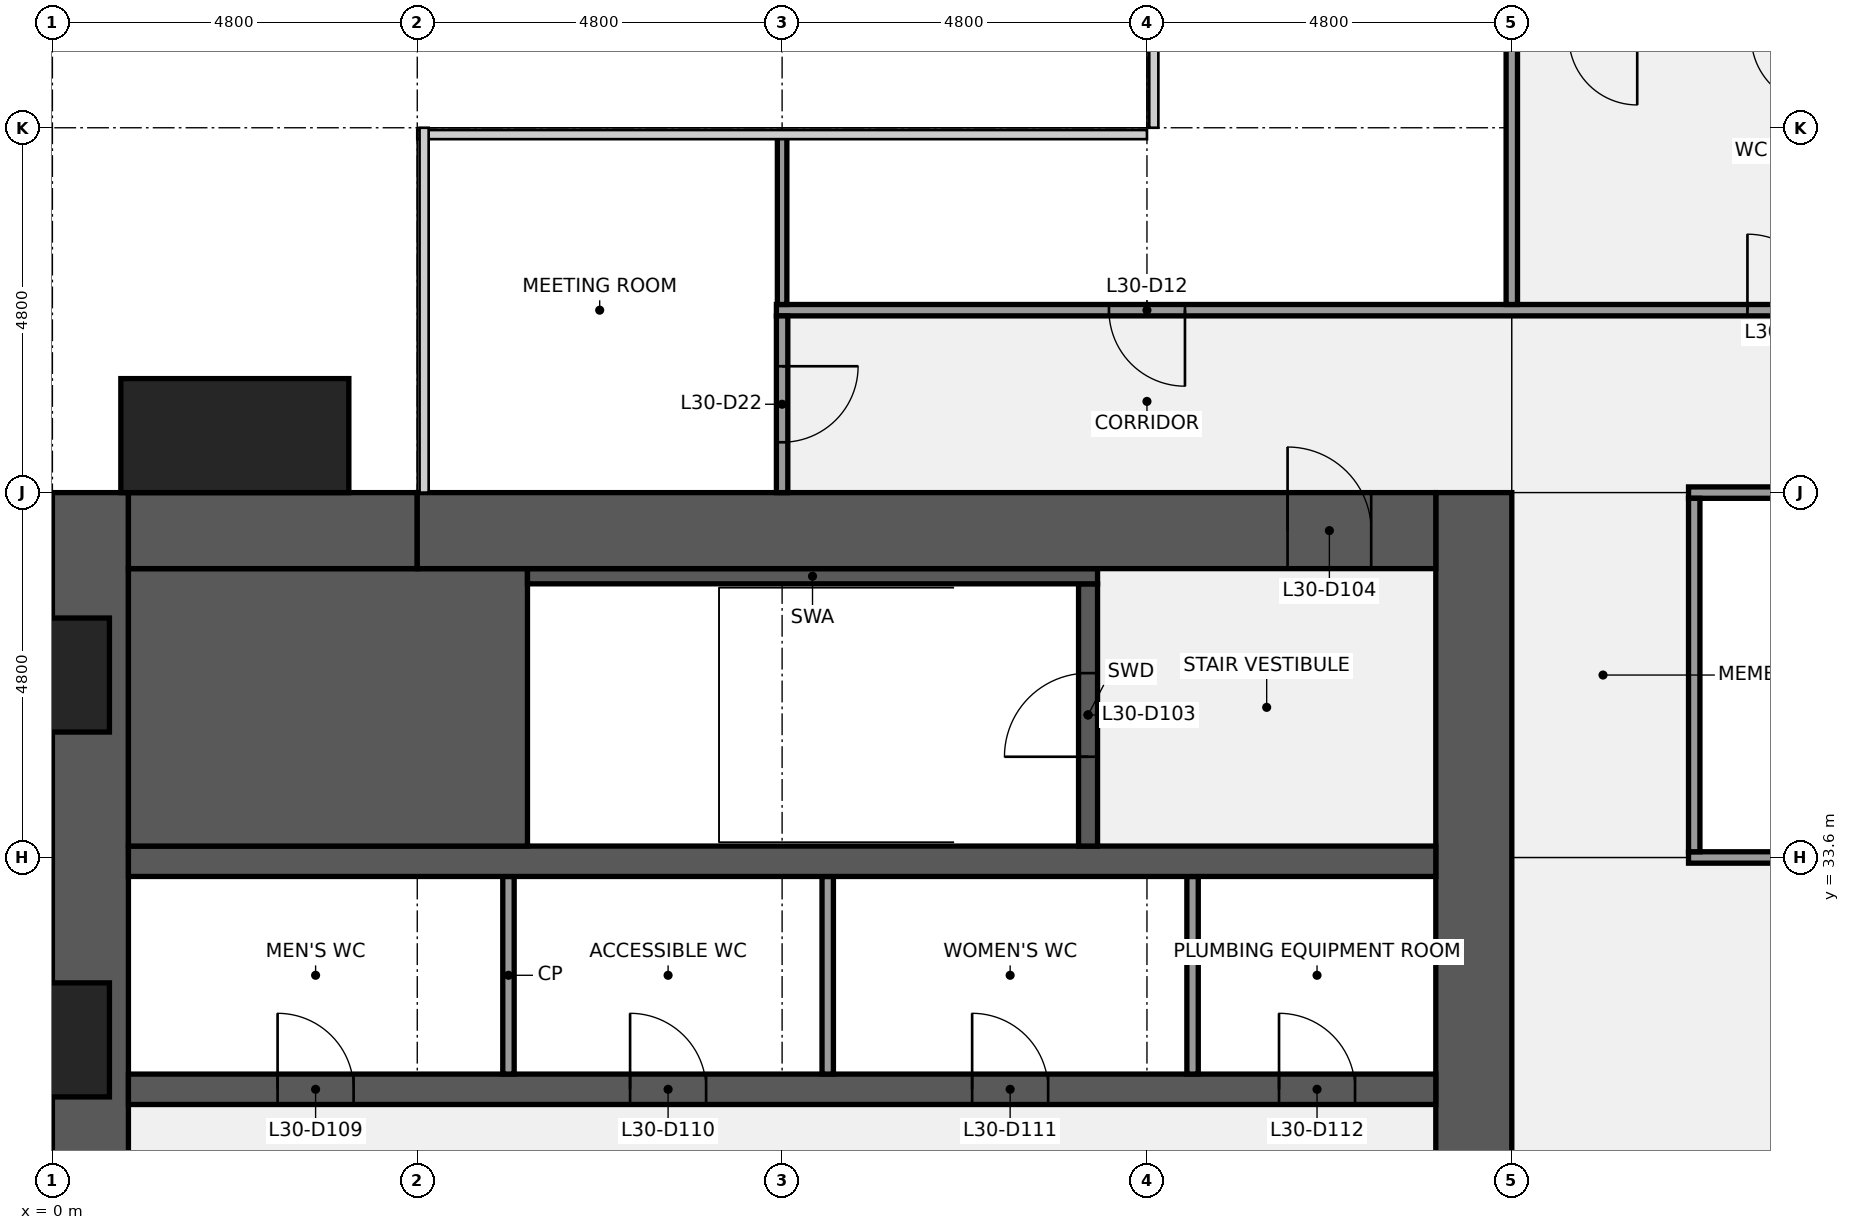
"""IFC4 building model, lengths in metres.
Left out: names, types, materials, properties, quantities, classifications, styles, units other than length and angle.
Written with IfcOpenShell. Run it as: python <this file> out.ifc"""

import sys

from ifc_helpers import new_model, si_unit, direction, frame, frame_2d, origin, origin_2d, place, context, subcontext, project, spatial, rectangle, extrude, element, fill, save


model = new_model("IFC4")
c1 = context("Model", 3, precision=1e-05, world=origin(), true_north=direction((0.0, 1.0)))
c2 = subcontext(c1, "Body", "Model", "MODEL_VIEW")
j1 = project(units=[si_unit("LENGTHUNIT", "METRE"), si_unit("PLANEANGLEUNIT", "RADIAN")], contexts=[c1])
p1 = place(None, origin())
s1 = spatial("IfcSite", under=j1, at=p1, CompositionType="ELEMENT")
p2 = place(p1, origin())
s2 = spatial("IfcBuilding", under=s1, at=p2, CompositionType="ELEMENT")
p3 = place(p2, frame((0.0, 0.0, 140.1)))
s3 = spatial("IfcBuildingStorey", under=s2, at=p3, CompositionType="ELEMENT", Elevation=140.1)
p4 = place(p3, frame((0.5, 9.6, 0.0), z_axis=(0.0, 0.0, 1.0), x_axis=(0.0, 1.0, 0.0)))
e1 = element("IfcWall", 1, at=p4, inside=s3, PredefinedType="SHEAR", context=c2, shape_type="SweptSolid", body=[
    extrude(rectangle(XDim=28.8, YDim=1.0, at=frame_2d((14.4, 0.0))), origin(), (0.0, 0.0, 1.0), 3.84),
])
p5 = place(p4, frame((8.85, 0.0, 0.9)))
e2 = element("IfcOpeningElement", 2, at=p5, cuts=e1, PredefinedType="OPENING", context=c2, shape_type="SweptSolid", body=[
    extrude(rectangle(XDim=1.5, YDim=1.5, at=frame_2d((0.75, 0.75))), frame((0.0, 0.51, 0.0), z_axis=(0.0, -1.0, 0.0), x_axis=(1.0, 0.0, 0.0)), (0.0, 0.0, 1.0), 1.02),
])
p6 = place(p4, frame((18.45, 0.0, 0.9)))
e3 = element("IfcOpeningElement", 3, at=p6, cuts=e1, PredefinedType="OPENING", context=c2, shape_type="SweptSolid", body=[
    extrude(rectangle(XDim=1.5, YDim=1.5, at=frame_2d((0.75, 0.75))), frame((0.0, 0.51, 0.0), z_axis=(0.0, -1.0, 0.0), x_axis=(1.0, 0.0, 0.0)), (0.0, 0.0, 1.0), 1.02),
])
p7 = place(p3, frame((18.7, 38.4, 0.0), z_axis=(0.0, 0.0, 1.0), x_axis=(0.0, -1.0, 0.0)))
e4 = element("IfcWall", 4, at=p7, inside=s3, PredefinedType="SHEAR", context=c2, shape_type="SweptSolid", body=[
    extrude(rectangle(XDim=28.8, YDim=1.0, at=frame_2d((14.4, 0.0))), origin(), (0.0, 0.0, 1.0), 3.84),
])
p8 = place(p7, frame((18.3, 0.0, 0.0)))
e5 = element("IfcOpeningElement", 5, at=p8, cuts=e4, PredefinedType="OPENING", context=c2, shape_type="SweptSolid", body=[
    extrude(rectangle(XDim=1.8, YDim=2.1, at=frame_2d((0.9, 1.05))), frame((0.0, 0.51, 0.0), z_axis=(0.0, -1.0, 0.0), x_axis=(1.0, 0.0, 0.0)), (0.0, 0.0, 1.0), 1.02),
])
p9 = place(p7, frame((8.7, 0.0, 0.0)))
e6 = element("IfcOpeningElement", 6, at=p9, cuts=e4, PredefinedType="OPENING", context=c2, shape_type="SweptSolid", body=[
    extrude(rectangle(XDim=1.8, YDim=2.1, at=frame_2d((0.9, 1.05))), frame((0.0, 0.51, 0.0), z_axis=(0.0, -1.0, 0.0), x_axis=(1.0, 0.0, 0.0)), (0.0, 0.0, 1.0), 1.02),
])
p10 = place(p3, frame((1.0, 30.55, 0.0), z_axis=(0.0, 0.0, 1.0), x_axis=(1.0, 0.0, 0.0)))
e7 = element("IfcWall", 7, at=p10, inside=s3, PredefinedType="SHEAR", context=c2, shape_type="SweptSolid", body=[
    extrude(rectangle(XDim=17.2, YDim=0.4, at=frame_2d((8.6, 0.0))), origin(), (0.0, 0.0, 1.0), 3.84),
])
p11 = place(p10, frame((1.962, 0.0, 0.0)))
e8 = element("IfcOpeningElement", 8, at=p11, cuts=e7, PredefinedType="OPENING", context=c2, shape_type="SweptSolid", body=[
    extrude(rectangle(XDim=1.0, YDim=2.1, at=frame_2d((0.5, 1.05))), frame((0.0, 0.21, 0.0), z_axis=(0.0, -1.0, 0.0), x_axis=(1.0, 0.0, 0.0)), (0.0, 0.0, 1.0), 0.42),
])
p12 = place(p10, frame((6.6, 0.0, 0.0)))
e9 = element("IfcOpeningElement", 9, at=p12, cuts=e7, PredefinedType="OPENING", context=c2, shape_type="SweptSolid", body=[
    extrude(rectangle(XDim=1.0, YDim=2.1, at=frame_2d((0.5, 1.05))), frame((0.0, 0.21, 0.0), z_axis=(0.0, -1.0, 0.0), x_axis=(1.0, 0.0, 0.0)), (0.0, 0.0, 1.0), 0.42),
])
p13 = place(p10, frame((11.1, 0.0, 0.0)))
e10 = element("IfcOpeningElement", 10, at=p13, cuts=e7, PredefinedType="OPENING", context=c2, shape_type="SweptSolid", body=[
    extrude(rectangle(XDim=1.0, YDim=2.1, at=frame_2d((0.5, 1.05))), frame((0.0, 0.21, 0.0), z_axis=(0.0, -1.0, 0.0), x_axis=(1.0, 0.0, 0.0)), (0.0, 0.0, 1.0), 0.42),
])
p14 = place(p10, frame((15.137, 0.0, 0.0)))
e11 = element("IfcOpeningElement", 11, at=p14, cuts=e7, PredefinedType="OPENING", context=c2, shape_type="SweptSolid", body=[
    extrude(rectangle(XDim=1.0, YDim=2.1, at=frame_2d((0.5, 1.05))), frame((0.0, 0.21, 0.0), z_axis=(0.0, -1.0, 0.0), x_axis=(1.0, 0.0, 0.0)), (0.0, 0.0, 1.0), 0.42),
])
for number, where, z_axis, x_axis in (
    (12, (6.0, 30.75, 0.0), (0.0, 0.0, 1.0), (0.0, 1.0, 0.0)),
    (13, (10.2, 30.75, 0.0), (0.0, 0.0, 1.0), (0.0, 1.0, 0.0)),
    (14, (15.0, 30.75, 0.0), (0.0, 0.0, 1.0), (0.0, 1.0, 0.0)),
):
    element("IfcWall", number, at=place(p3, frame(where, z_axis=z_axis, x_axis=x_axis)), inside=s3, PredefinedType="PARTITIONING", context=c2, shape_type="SweptSolid", body=[
        extrude(rectangle(XDim=2.6, YDim=0.15, at=frame_2d((1.3, 0.0))), origin(), (0.0, 0.0, 1.0), 3.84),
    ])
p15 = place(p3, frame((1.0, 33.55, 0.0), z_axis=(0.0, 0.0, 1.0), x_axis=(1.0, 0.0, 0.0)))
e15 = element("IfcWall", 15, at=p15, inside=s3, PredefinedType="SHEAR", context=c2, shape_type="SweptSolid", body=[
    extrude(rectangle(XDim=17.2, YDim=0.4, at=frame_2d((8.6, 0.0))), origin(), (0.0, 0.0, 1.0), 3.84),
])
p16 = place(p3, frame((1.0, 35.575, 0.0), z_axis=(0.0, 0.0, 1.0), x_axis=(1.0, 0.0, 0.0)))
e16 = element("IfcWall", 16, at=p16, inside=s3, PredefinedType="SHEAR", context=c2, shape_type="SweptSolid", body=[
    extrude(rectangle(XDim=5.25, YDim=3.65, at=frame_2d((2.625, 0.0))), origin(), (0.0, 0.0, 1.0), 3.84),
])
p17 = place(p3, frame((13.625, 33.75, 0.0), z_axis=(0.0, 0.0, 1.0), x_axis=(0.0, 1.0, 0.0)))
e17 = element("IfcWall", 17, at=p17, inside=s3, PredefinedType="SHEAR", context=c2, shape_type="SweptSolid", body=[
    extrude(rectangle(XDim=3.45, YDim=0.25, at=frame_2d((1.725, 0.0))), origin(), (0.0, 0.0, 1.0), 3.84),
])
p18 = place(p17, frame((1.175, 0.0, 0.0)))
e18 = element("IfcOpeningElement", 18, at=p18, cuts=e17, PredefinedType="OPENING", context=c2, shape_type="SweptSolid", body=[
    extrude(rectangle(XDim=1.1, YDim=2.1, at=frame_2d((0.55, 1.05))), frame((0.0, 0.135, 0.0), z_axis=(0.0, -1.0, 0.0), x_axis=(1.0, 0.0, 0.0)), (0.0, 0.0, 1.0), 0.27),
])
p19 = place(p3, frame((6.25, 37.3, 0.0), z_axis=(0.0, 0.0, 1.0), x_axis=(1.0, 0.0, 0.0)))
e19 = element("IfcWall", 19, at=p19, inside=s3, PredefinedType="SHEAR", context=c2, shape_type="SweptSolid", body=[
    extrude(rectangle(XDim=7.5, YDim=0.2, at=frame_2d((3.75, 0.0))), origin(), (0.0, 0.0, 1.0), 3.84),
])
p20 = place(p3, frame((1.0, 37.9, 0.0), z_axis=(0.0, 0.0, 1.0), x_axis=(1.0, 0.0, 0.0)))
e20 = element("IfcWall", 20, at=p20, inside=s3, PredefinedType="SHEAR", context=c2, shape_type="SweptSolid", body=[
    extrude(rectangle(XDim=3.8, YDim=1.0, at=frame_2d((1.9, 0.0))), origin(), (0.0, 0.0, 1.0), 3.84),
])
p21 = place(p3, frame((4.8, 37.9, 0.0), z_axis=(0.0, 0.0, 1.0), x_axis=(1.0, 0.0, 0.0)))
e21 = element("IfcWall", 21, at=p21, inside=s3, PredefinedType="SHEAR", context=c2, shape_type="SweptSolid", body=[
    extrude(rectangle(XDim=13.4, YDim=1.0, at=frame_2d((6.7, 0.0))), origin(), (0.0, 0.0, 1.0), 3.84),
])
p22 = place(p21, frame((11.45, 0.0, 0.0)))
e22 = element("IfcOpeningElement", 22, at=p22, cuts=e21, PredefinedType="OPENING", context=c2, shape_type="SweptSolid", body=[
    extrude(rectangle(XDim=1.1, YDim=2.1, at=frame_2d((0.55, 1.05))), frame((0.0, 0.51, 0.0), z_axis=(0.0, -1.0, 0.0), x_axis=(1.0, 0.0, 0.0)), (0.0, 0.0, 1.0), 1.02),
])
p23 = place(p3, frame((21.525, 33.6, 0.0), z_axis=(0.0, 0.0, 1.0), x_axis=(1.0, 0.0, 0.0)))
e23 = element("IfcWall", 23, at=p23, inside=s3, PredefinedType="PARTITIONING", context=c2, shape_type="SweptSolid", body=[
    extrude(rectangle(XDim=2.55, YDim=0.15, at=frame_2d((1.275, 0.0))), origin(), (0.0, 0.0, 1.0), 2.936),
])
p24 = place(p3, frame((21.525, 38.4, 0.0), z_axis=(0.0, 0.0, 1.0), x_axis=(1.0, 0.0, 0.0)))
e24 = element("IfcWall", 24, at=p24, inside=s3, PredefinedType="PARTITIONING", context=c2, shape_type="SweptSolid", body=[
    extrude(rectangle(XDim=14.55, YDim=0.15, at=frame_2d((7.275, 0.0))), origin(), (0.0, 0.0, 1.0), 2.936),
])
p25 = place(p24, frame((3.175, 0.0, 0.0)))
e25 = element("IfcOpeningElement", 25, at=p25, cuts=e24, PredefinedType="OPENING", context=c2, shape_type="SweptSolid", body=[
    extrude(rectangle(XDim=1.0, YDim=2.1, at=frame_2d((0.5, 1.05))), frame((0.0, 0.085, 0.0), z_axis=(0.0, -1.0, 0.0), x_axis=(1.0, 0.0, 0.0)), (0.0, 0.0, 1.0), 0.17),
])
p26 = place(p24, frame((10.375, 0.0, 0.0)))
e26 = element("IfcOpeningElement", 26, at=p26, cuts=e24, PredefinedType="OPENING", context=c2, shape_type="SweptSolid", body=[
    extrude(rectangle(XDim=1.0, YDim=2.1, at=frame_2d((0.5, 1.05))), frame((0.0, 0.085, 0.0), z_axis=(0.0, -1.0, 0.0), x_axis=(1.0, 0.0, 0.0)), (0.0, 0.0, 1.0), 0.17),
])
p27 = place(p3, frame((9.525, 40.8, 0.0), z_axis=(0.0, 0.0, 1.0), x_axis=(1.0, 0.0, 0.0)))
e27 = element("IfcWall", 27, at=p27, inside=s3, PredefinedType="PARTITIONING", context=c2, shape_type="SweptSolid", body=[
    extrude(rectangle(XDim=38.55, YDim=0.15, at=frame_2d((19.275, 0.0))), origin(), (0.0, 0.0, 1.0), 2.936),
])
p28 = place(p27, frame((4.375, 0.0, 0.0)))
e28 = element("IfcOpeningElement", 28, at=p28, cuts=e27, PredefinedType="OPENING", context=c2, shape_type="SweptSolid", body=[
    extrude(rectangle(XDim=1.0, YDim=2.1, at=frame_2d((0.5, 1.05))), frame((0.0, 0.085, 0.0), z_axis=(0.0, -1.0, 0.0), x_axis=(1.0, 0.0, 0.0)), (0.0, 0.0, 1.0), 0.17),
])
p29 = place(p27, frame((12.775, 0.0, 0.0)))
e29 = element("IfcOpeningElement", 29, at=p29, cuts=e27, PredefinedType="OPENING", context=c2, shape_type="SweptSolid", body=[
    extrude(rectangle(XDim=1.0, YDim=2.1, at=frame_2d((0.5, 1.05))), frame((0.0, 0.085, 0.0), z_axis=(0.0, -1.0, 0.0), x_axis=(1.0, 0.0, 0.0)), (0.0, 0.0, 1.0), 0.17),
])
p30 = place(p27, frame((17.575, 0.0, 0.0)))
e30 = element("IfcOpeningElement", 30, at=p30, cuts=e27, PredefinedType="OPENING", context=c2, shape_type="SweptSolid", body=[
    extrude(rectangle(XDim=1.0, YDim=2.1, at=frame_2d((0.5, 1.05))), frame((0.0, 0.085, 0.0), z_axis=(0.0, -1.0, 0.0), x_axis=(1.0, 0.0, 0.0)), (0.0, 0.0, 1.0), 0.17),
])
p31 = place(p27, frame((19.975, 0.0, 0.0)))
e31 = element("IfcOpeningElement", 31, at=p31, cuts=e27, PredefinedType="OPENING", context=c2, shape_type="SweptSolid", body=[
    extrude(rectangle(XDim=1.0, YDim=2.1, at=frame_2d((0.5, 1.05))), frame((0.0, 0.085, 0.0), z_axis=(0.0, -1.0, 0.0), x_axis=(1.0, 0.0, 0.0)), (0.0, 0.0, 1.0), 0.17),
])
p32 = place(p27, frame((23.575, 0.0, 0.0)))
e32 = element("IfcOpeningElement", 32, at=p32, cuts=e27, PredefinedType="OPENING", context=c2, shape_type="SweptSolid", body=[
    extrude(rectangle(XDim=1.0, YDim=2.1, at=frame_2d((0.5, 1.05))), frame((0.0, 0.085, 0.0), z_axis=(0.0, -1.0, 0.0), x_axis=(1.0, 0.0, 0.0)), (0.0, 0.0, 1.0), 0.17),
])
p33 = place(p27, frame((27.175, 0.0, 0.0)))
e33 = element("IfcOpeningElement", 33, at=p33, cuts=e27, PredefinedType="OPENING", context=c2, shape_type="SweptSolid", body=[
    extrude(rectangle(XDim=1.0, YDim=2.1, at=frame_2d((0.5, 1.05))), frame((0.0, 0.085, 0.0), z_axis=(0.0, -1.0, 0.0), x_axis=(1.0, 0.0, 0.0)), (0.0, 0.0, 1.0), 0.17),
])
p34 = place(p27, frame((33.175, 0.0, 0.0)))
e34 = element("IfcOpeningElement", 34, at=p34, cuts=e27, PredefinedType="OPENING", context=c2, shape_type="SweptSolid", body=[
    extrude(rectangle(XDim=1.0, YDim=2.1, at=frame_2d((0.5, 1.05))), frame((0.0, 0.085, 0.0), z_axis=(0.0, -1.0, 0.0), x_axis=(1.0, 0.0, 0.0)), (0.0, 0.0, 1.0), 0.17),
])
p35 = place(p3, frame((9.6, 40.875, 0.0), z_axis=(0.0, 0.0, 1.0), x_axis=(0.0, 1.0, 0.0)))
e35 = element("IfcWall", 35, at=p35, inside=s3, PredefinedType="PARTITIONING", context=c2, shape_type="SweptSolid", body=[
    extrude(rectangle(XDim=2.225, YDim=0.125, at=frame_2d((1.113, 0.0))), origin(), (0.0, 0.0, 1.0), 2.936),
])
p36 = place(p3, frame((9.6, 38.4, 0.0), z_axis=(0.0, 0.0, 1.0), x_axis=(0.0, 1.0, 0.0)))
e36 = element("IfcWall", 36, at=p36, inside=s3, PredefinedType="PARTITIONING", context=c2, shape_type="SweptSolid", body=[
    extrude(rectangle(XDim=2.325, YDim=0.15, at=frame_2d((1.163, 0.0))), origin(), (0.0, 0.0, 1.0), 2.936),
])
p37 = place(p36, frame((0.663, 0.0, 0.0)))
e37 = element("IfcOpeningElement", 37, at=p37, cuts=e36, PredefinedType="OPENING", context=c2, shape_type="SweptSolid", body=[
    extrude(rectangle(XDim=1.0, YDim=2.1, at=frame_2d((0.5, 1.05))), frame((0.0, 0.085, 0.0), z_axis=(0.0, -1.0, 0.0), x_axis=(1.0, 0.0, 0.0)), (0.0, 0.0, 1.0), 0.17),
])
p38 = place(p3, frame((19.2, 40.875, 0.0), z_axis=(0.0, 0.0, 1.0), x_axis=(0.0, 1.0, 0.0)))
e38 = element("IfcWall", 38, at=p38, inside=s3, PredefinedType="PARTITIONING", context=c2, shape_type="SweptSolid", body=[
    extrude(rectangle(XDim=3.45, YDim=0.15, at=frame_2d((1.725, 0.0))), origin(), (0.0, 0.0, 1.0), 2.936),
])
p39 = place(p3, frame((21.6, 33.675, 0.0), z_axis=(0.0, 0.0, 1.0), x_axis=(0.0, 1.0, 0.0)))
e39 = element("IfcWall", 39, at=p39, inside=s3, PredefinedType="PARTITIONING", context=c2, shape_type="SweptSolid", body=[
    extrude(rectangle(XDim=4.65, YDim=0.15, at=frame_2d((2.325, 0.0))), origin(), (0.0, 0.0, 1.0), 2.936),
])
p40 = place(p3, frame((2.4, 39.15, 0.0), z_axis=(0.0, 0.0, 1.0), x_axis=(1.0, 0.0, 0.0)))
e40 = element("IfcColumn", 40, at=p40, inside=s3, PredefinedType="PILASTER", context=c2, shape_type="SweptSolid", body=[
    extrude(rectangle(XDim=3.0, YDim=1.5, at=origin_2d()), origin(), (0.0, 0.0, 1.0), 4.0),
])
p41 = place(p18, origin())
e41 = element("IfcDoor", 41, at=p41, inside=s3, OperationType="SINGLE_SWING_LEFT", PredefinedType="DOOR", context=c2, shape_type="SweptSolid", body=[
    extrude(rectangle(XDim=1.1, YDim=2.1, at=frame_2d((0.55, 1.05))), frame((0.0, 0.025, 0.0), z_axis=(0.0, -1.0, 0.0), x_axis=(1.0, 0.0, 0.0)), (0.0, 0.0, 1.0), 0.05),
])
fill(e18, e41)
p42 = place(p22, origin())
e42 = element("IfcDoor", 42, at=p42, inside=s3, OperationType="SINGLE_SWING_LEFT", PredefinedType="DOOR", context=c2, shape_type="SweptSolid", body=[
    extrude(rectangle(XDim=1.1, YDim=2.1, at=frame_2d((0.55, 1.05))), frame((0.0, 0.025, 0.0), z_axis=(0.0, -1.0, 0.0), x_axis=(1.0, 0.0, 0.0)), (0.0, 0.0, 1.0), 0.05),
])
fill(e22, e42)
p43 = place(p11, origin())
e43 = element("IfcDoor", 43, at=p43, inside=s3, OperationType="SINGLE_SWING_LEFT", PredefinedType="DOOR", context=c2, shape_type="SweptSolid", body=[
    extrude(rectangle(XDim=1.0, YDim=2.1, at=frame_2d((0.5, 1.05))), frame((0.0, 0.025, 0.0), z_axis=(0.0, -1.0, 0.0), x_axis=(1.0, 0.0, 0.0)), (0.0, 0.0, 1.0), 0.05),
])
fill(e8, e43)
p44 = place(p12, origin())
e44 = element("IfcDoor", 44, at=p44, inside=s3, OperationType="SINGLE_SWING_LEFT", PredefinedType="DOOR", context=c2, shape_type="SweptSolid", body=[
    extrude(rectangle(XDim=1.0, YDim=2.1, at=frame_2d((0.5, 1.05))), frame((0.0, 0.025, 0.0), z_axis=(0.0, -1.0, 0.0), x_axis=(1.0, 0.0, 0.0)), (0.0, 0.0, 1.0), 0.05),
])
fill(e9, e44)
p45 = place(p13, origin())
e45 = element("IfcDoor", 45, at=p45, inside=s3, OperationType="SINGLE_SWING_LEFT", PredefinedType="DOOR", context=c2, shape_type="SweptSolid", body=[
    extrude(rectangle(XDim=1.0, YDim=2.1, at=frame_2d((0.5, 1.05))), frame((0.0, 0.025, 0.0), z_axis=(0.0, -1.0, 0.0), x_axis=(1.0, 0.0, 0.0)), (0.0, 0.0, 1.0), 0.05),
])
fill(e10, e45)
p46 = place(p14, origin())
e46 = element("IfcDoor", 46, at=p46, inside=s3, OperationType="SINGLE_SWING_LEFT", PredefinedType="DOOR", context=c2, shape_type="SweptSolid", body=[
    extrude(rectangle(XDim=1.0, YDim=2.1, at=frame_2d((0.5, 1.05))), frame((0.0, 0.025, 0.0), z_axis=(0.0, -1.0, 0.0), x_axis=(1.0, 0.0, 0.0)), (0.0, 0.0, 1.0), 0.05),
])
fill(e11, e46)
p47 = place(p28, origin())
e47 = element("IfcDoor", 47, at=p47, inside=s3, OperationType="SINGLE_SWING_RIGHT", PredefinedType="DOOR", context=c2, shape_type="SweptSolid", body=[
    extrude(rectangle(XDim=1.0, YDim=2.1, at=frame_2d((0.5, 1.05))), frame((0.0, 0.025, 0.0), z_axis=(0.0, -1.0, 0.0), x_axis=(1.0, 0.0, 0.0)), (0.0, 0.0, 1.0), 0.05),
])
fill(e28, e47)
p48 = place(p29, origin())
e48 = element("IfcDoor", 48, at=p48, inside=s3, OperationType="SINGLE_SWING_LEFT", PredefinedType="DOOR", context=c2, shape_type="SweptSolid", body=[
    extrude(rectangle(XDim=1.0, YDim=2.1, at=frame_2d((0.5, 1.05))), frame((0.0, 0.025, 0.0), z_axis=(0.0, -1.0, 0.0), x_axis=(1.0, 0.0, 0.0)), (0.0, 0.0, 1.0), 0.05),
])
fill(e29, e48)
p49 = place(p37, origin())
e49 = element("IfcDoor", 49, at=p49, inside=s3, OperationType="SINGLE_SWING_RIGHT", PredefinedType="DOOR", context=c2, shape_type="SweptSolid", body=[
    extrude(rectangle(XDim=1.0, YDim=2.1, at=frame_2d((0.5, 1.05))), frame((0.0, 0.025, 0.0), z_axis=(0.0, -1.0, 0.0), x_axis=(1.0, 0.0, 0.0)), (0.0, 0.0, 1.0), 0.05),
])
fill(e37, e49)
save(model, sys.argv[1])
